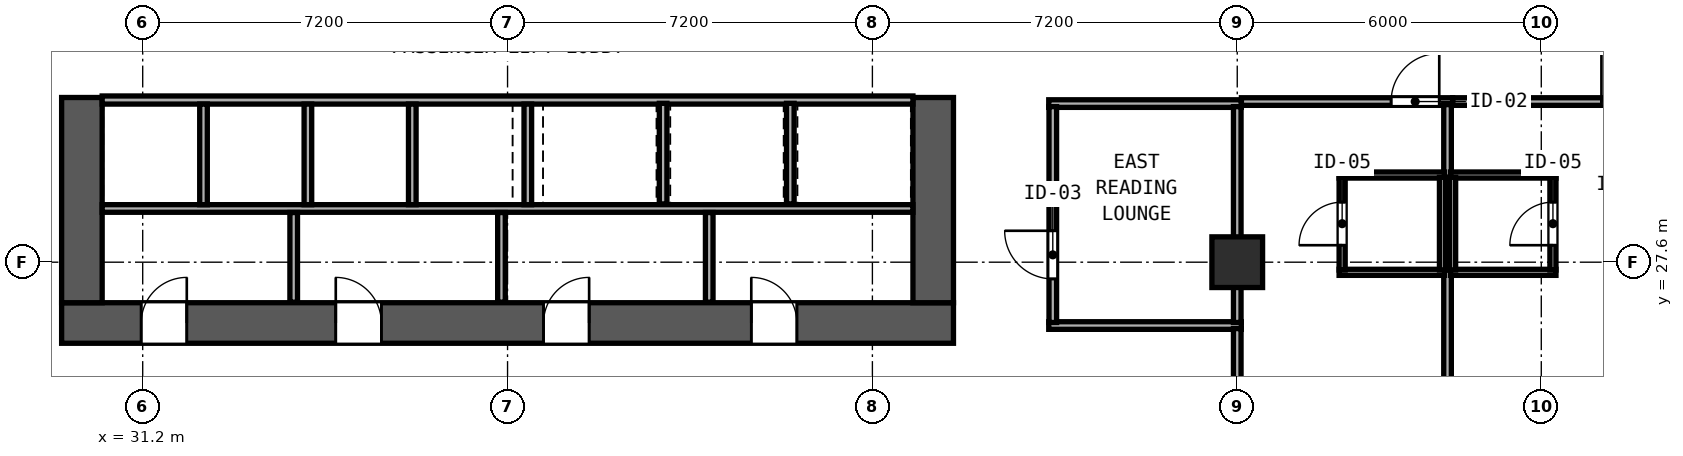
"""IFC4 building model, lengths in metres.
Left out: names, types, materials, properties, quantities, classifications, styles, units other than length and angle.
Written with IfcOpenShell. Run it as: python <this file> out.ifc"""

import sys

from ifc_helpers import new_model, si_unit, direction, frame, frame_2d, origin, origin_2d, place, context, subcontext, project, spatial, rectangle, hollow_rectangle, extrude, element, fill, save


model = new_model("IFC4")
c1 = context("Model", 3, precision=1e-05, world=origin(), true_north=direction((0.0, 1.0)))
c2 = subcontext(c1, "Body", "Model", "MODEL_VIEW")
j1 = project(units=[si_unit("LENGTHUNIT", "METRE"), si_unit("PLANEANGLEUNIT", "RADIAN")], contexts=[c1])
p1 = place(None, origin())
s1 = spatial("IfcSite", under=j1, at=p1, CompositionType="ELEMENT")
p2 = place(p1, origin())
s2 = spatial("IfcBuilding", under=s1, at=p2, CompositionType="ELEMENT")
p3 = place(p2, frame((0.0, 0.0, 81.8)))
s3 = spatial("IfcBuildingStorey", under=s2, at=p3, CompositionType="ELEMENT", Elevation=81.8)
p4 = place(p3, frame((29.6, 26.4, 0.0), z_axis=(0.0, 0.0, 1.0), x_axis=(1.0, 0.0, 0.0)))
e1 = element("IfcWall", 1, at=p4, inside=s3, PredefinedType="SHEAR", context=c2, shape_type="SweptSolid", body=[
    extrude(rectangle(XDim=17.6, YDim=0.8, at=frame_2d((8.8, 0.0))), origin(), (0.0, 0.0, 1.0), 3.6),
])
p5 = place(p4, frame((2.47, 0.0, 0.0), z_axis=(0.0, 0.0, 1.0), x_axis=(-1.0, 0.0, 0.0)))
e2 = element("IfcOpeningElement", 2, at=p5, cuts=e1, PredefinedType="OPENING", context=c2, shape_type="SweptSolid", body=[
    extrude(rectangle(XDim=0.9, YDim=2.1, at=frame_2d((0.45, 1.05))), frame((0.0, 0.41, 0.0), z_axis=(0.0, -1.0, 0.0), x_axis=(1.0, 0.0, 0.0)), (0.0, 0.0, 1.0), 0.82),
])
p6 = place(p4, frame((6.31, 0.0, 0.0), z_axis=(0.0, 0.0, 1.0), x_axis=(-1.0, 0.0, 0.0)))
e3 = element("IfcOpeningElement", 3, at=p6, cuts=e1, PredefinedType="OPENING", context=c2, shape_type="SweptSolid", body=[
    extrude(rectangle(XDim=0.9, YDim=2.1, at=frame_2d((0.45, 1.05))), frame((0.0, 0.41, 0.0), z_axis=(0.0, -1.0, 0.0), x_axis=(1.0, 0.0, 0.0)), (0.0, 0.0, 1.0), 0.82),
])
p7 = place(p4, frame((10.41, 0.0, 0.0), z_axis=(0.0, 0.0, 1.0), x_axis=(-1.0, 0.0, 0.0)))
e4 = element("IfcOpeningElement", 4, at=p7, cuts=e1, PredefinedType="OPENING", context=c2, shape_type="SweptSolid", body=[
    extrude(rectangle(XDim=0.9, YDim=2.1, at=frame_2d((0.45, 1.05))), frame((0.0, 0.41, 0.0), z_axis=(0.0, -1.0, 0.0), x_axis=(1.0, 0.0, 0.0)), (0.0, 0.0, 1.0), 0.82),
])
p8 = place(p4, frame((14.51, 0.0, 0.0), z_axis=(0.0, 0.0, 1.0), x_axis=(-1.0, 0.0, 0.0)))
e5 = element("IfcOpeningElement", 5, at=p8, cuts=e1, PredefinedType="OPENING", context=c2, shape_type="SweptSolid", body=[
    extrude(rectangle(XDim=0.9, YDim=2.1, at=frame_2d((0.45, 1.05))), frame((0.0, 0.41, 0.0), z_axis=(0.0, -1.0, 0.0), x_axis=(1.0, 0.0, 0.0)), (0.0, 0.0, 1.0), 0.82),
])
for number, where, z_axis, x_axis in (
    (6, (30.0, 26.8, 0.0), (0.0, 0.0, 1.0), (0.0, 1.0, 0.0)),
    (7, (46.8, 26.8, 0.0), (0.0, 0.0, 1.0), (0.0, 1.0, 0.0)),
):
    element("IfcWall", number, at=place(p3, frame(where, z_axis=z_axis, x_axis=x_axis)), inside=s3, PredefinedType="SHEAR", context=c2, shape_type="SweptSolid", body=[
        extrude(rectangle(XDim=4.05, YDim=0.8, at=frame_2d((2.025, 0.0))), origin(), (0.0, 0.0, 1.0), 3.6),
    ])
p9 = place(p3, frame((52.8, 27.6, 0.0), z_axis=(0.0, 0.0, 1.0), x_axis=(1.0, 0.0, 0.0)))
e8 = element("IfcColumn", 8, at=p9, inside=s3, PredefinedType="COLUMN", context=c2, shape_type="SweptSolid", body=[
    extrude(hollow_rectangle(XDim=1.0, YDim=1.0, WallThickness=0.038, at=origin_2d()), origin(), (0.0, 0.0, 1.0), 3.8),
])
p10 = place(p3, frame((30.4, 30.8, 0.0), z_axis=(0.0, 0.0, 1.0), x_axis=(1.0, 0.0, 0.0)))
e9 = element("IfcWall", 9, at=p10, inside=s3, PredefinedType="SOLIDWALL", context=c2, shape_type="SweptSolid", body=[
    extrude(rectangle(XDim=16.0, YDim=0.16, at=frame_2d((8.0, 0.0))), origin(), (0.0, 0.0, 1.0), 3.6),
])
p11 = place(p3, frame((30.4, 28.66, 0.0), z_axis=(0.0, 0.0, 1.0), x_axis=(1.0, 0.0, 0.0)))
e10 = element("IfcWall", 10, at=p11, inside=s3, PredefinedType="PARTITIONING", context=c2, shape_type="SweptSolid", body=[
    extrude(rectangle(XDim=16.0, YDim=0.15, at=frame_2d((8.0, 0.0))), origin(), (0.0, 0.0, 1.0), 3.6),
])
for number, where, z_axis, x_axis in (
    (11, (32.4, 28.735, 0.0), (0.0, 0.0, 1.0), (0.0, 1.0, 0.0)),
    (12, (34.46, 28.735, 0.0), (0.0, 0.0, 1.0), (0.0, 1.0, 0.0)),
    (13, (36.52, 28.735, 0.0), (0.0, 0.0, 1.0), (0.0, 1.0, 0.0)),
    (14, (38.8, 28.735, 0.0), (0.0, 0.0, 1.0), (0.0, 1.0, 0.0)),
):
    element("IfcWall", number, at=place(p3, frame(where, z_axis=z_axis, x_axis=x_axis)), inside=s3, PredefinedType="SOLIDWALL", context=c2, shape_type="SweptSolid", body=[
        extrude(rectangle(XDim=1.985, YDim=0.15, at=frame_2d((0.992, 0.0))), origin(), (0.0, 0.0, 1.0), 3.6),
    ])
for number, where, z_axis, x_axis in (
    (15, (34.18, 26.81, 0.0), (0.0, 0.0, 1.0), (0.0, 1.0, 0.0)),
    (16, (38.28, 26.81, 0.0), (0.0, 0.0, 1.0), (0.0, 1.0, 0.0)),
    (17, (42.38, 26.81, 0.0), (0.0, 0.0, 1.0), (0.0, 1.0, 0.0)),
):
    element("IfcWall", number, at=place(p3, frame(where, z_axis=z_axis, x_axis=x_axis)), inside=s3, PredefinedType="PARTITIONING", context=c2, shape_type="SweptSolid", body=[
        extrude(rectangle(XDim=1.77, YDim=0.15, at=frame_2d((0.885, 0.0))), origin(), (0.0, 0.0, 1.0), 3.6),
    ])
for number, where, z_axis, x_axis in (
    (18, (41.47, 28.75, 0.0), (0.0, 0.0, 1.0), (0.0, 1.0, 0.0)),
    (19, (43.98, 28.75, 0.0), (0.0, 0.0, 1.0), (0.0, 1.0, 0.0)),
):
    element("IfcWall", number, at=place(p3, frame(where, z_axis=z_axis, x_axis=x_axis)), inside=s3, PredefinedType="SOLIDWALL", context=c2, shape_type="SweptSolid", body=[
        extrude(rectangle(XDim=1.985, YDim=0.15, at=frame_2d((0.993, 0.0))), origin(), (0.0, 0.0, 1.0), 3.6),
    ])
for number, where, z_axis, x_axis in (
    (20, (49.08, 30.73, 0.0), (0.0, 0.0, 1.0), (1.0, 0.0, 0.0)),
    (21, (49.08, 26.35, 0.0), (0.0, 0.0, 1.0), (1.0, 0.0, 0.0)),
):
    element("IfcWall", number, at=place(p3, frame(where, z_axis=z_axis, x_axis=x_axis)), inside=s3, PredefinedType="PARTITIONING", context=c2, shape_type="SweptSolid", body=[
        extrude(rectangle(XDim=3.8, YDim=0.15, at=frame_2d((1.9, 0.0))), origin(), (0.0, 0.0, 1.0), 3.6),
    ])
p12 = place(p3, frame((49.16, 26.41, 0.0), z_axis=(0.0, 0.0, 1.0), x_axis=(0.0, 1.0, 0.0)))
e22 = element("IfcWall", 22, at=p12, inside=s3, PredefinedType="PARTITIONING", context=c2, shape_type="SweptSolid", body=[
    extrude(rectangle(XDim=4.26, YDim=0.15, at=frame_2d((2.13, 0.0))), origin(), (0.0, 0.0, 1.0), 3.6),
])
p13 = place(p12, frame((0.86, 0.0, 0.0)))
e23 = element("IfcOpeningElement", 23, at=p13, cuts=e22, PredefinedType="OPENING", context=c2, shape_type="SweptSolid", body=[
    extrude(rectangle(XDim=0.95, YDim=2.12, at=frame_2d((0.475, 1.06))), frame((0.0, 0.085, 0.0), z_axis=(0.0, -1.0, 0.0), x_axis=(1.0, 0.0, 0.0)), (0.0, 0.0, 1.0), 0.17),
])
p14 = place(p3, frame((52.8, 26.41, 0.0), z_axis=(0.0, 0.0, 1.0), x_axis=(0.0, 1.0, 0.0)))
e24 = element("IfcWall", 24, at=p14, inside=s3, PredefinedType="PARTITIONING", context=c2, shape_type="SweptSolid", body=[
    extrude(rectangle(XDim=4.26, YDim=0.15, at=frame_2d((2.13, 0.0))), origin(), (0.0, 0.0, 1.0), 3.097),
])
p15 = place(p3, frame((52.882, 30.77, 0.0), z_axis=(0.0, 0.0, 1.0), x_axis=(1.0, 0.0, 0.0)))
e25 = element("IfcWall", 25, at=p15, inside=s3, PredefinedType="PARTITIONING", context=c2, shape_type="SweptSolid", body=[
    extrude(rectangle(XDim=4.168, YDim=0.15, at=frame_2d((2.084, 0.0))), origin(), (0.0, 0.0, 1.0), 3.6),
])
p16 = place(p15, frame((3.905, 0.0, 0.0), z_axis=(0.0, 0.0, 1.0), x_axis=(-1.0, 0.0, 0.0)))
e26 = element("IfcOpeningElement", 26, at=p16, cuts=e25, PredefinedType="OPENING", context=c2, shape_type="SweptSolid", body=[
    extrude(rectangle(XDim=0.95, YDim=2.15, at=frame_2d((0.475, 1.075))), frame((0.0, 0.085, 0.0), z_axis=(0.0, -1.0, 0.0), x_axis=(1.0, 0.0, 0.0)), (0.0, 0.0, 1.0), 0.17),
])
p17 = place(p3, frame((52.8, 21.819, 0.0), z_axis=(0.0, 0.0, 1.0), x_axis=(0.0, 1.0, 0.0)))
e27 = element("IfcWall", 27, at=p17, inside=s3, PredefinedType="PARTITIONING", context=c2, shape_type="SweptSolid", body=[
    extrude(rectangle(XDim=4.471, YDim=0.15, at=frame_2d((2.236, 0.0))), origin(), (0.0, 0.0, 1.0), 3.097),
])
p18 = place(p3, frame((56.95, 18.889, 0.0), z_axis=(0.0, 0.0, 1.0), x_axis=(0.0, 1.0, 0.0)))
e28 = element("IfcWall", 28, at=p18, inside=s3, PredefinedType="PARTITIONING", context=c2, shape_type="SweptSolid", body=[
    extrude(rectangle(XDim=11.821, YDim=0.15, at=frame_2d((5.91, 0.0))), origin(), (0.0, 0.0, 1.0), 3.6),
])
p19 = place(p3, frame((54.81, 29.32, 0.0), z_axis=(0.0, 0.0, 1.0), x_axis=(1.0, 0.0, 0.0)))
e29 = element("IfcWall", 29, at=p19, inside=s3, PredefinedType="PARTITIONING", context=c2, shape_type="SweptSolid", body=[
    extrude(rectangle(XDim=2.08, YDim=0.12, at=frame_2d((1.04, 0.0))), origin(), (0.0, 0.0, 1.0), 3.6),
])
p20 = place(p3, frame((54.81, 27.4, 0.0), z_axis=(0.0, 0.0, 1.0), x_axis=(1.0, 0.0, 0.0)))
e30 = element("IfcWall", 30, at=p20, inside=s3, PredefinedType="PARTITIONING", context=c2, shape_type="SweptSolid", body=[
    extrude(rectangle(XDim=2.08, YDim=0.12, at=frame_2d((1.04, 0.0))), origin(), (0.0, 0.0, 1.0), 3.097),
])
p21 = place(p3, frame((54.87, 27.445, 0.0), z_axis=(0.0, 0.0, 1.0), x_axis=(0.0, 1.0, 0.0)))
e31 = element("IfcWall", 31, at=p21, inside=s3, PredefinedType="PARTITIONING", context=c2, shape_type="SweptSolid", body=[
    extrude(rectangle(XDim=1.83, YDim=0.12, at=frame_2d((0.915, 0.0))), origin(), (0.0, 0.0, 1.0), 3.6),
])
p22 = place(p21, frame((1.34, 0.0, 0.0), z_axis=(0.0, 0.0, 1.0), x_axis=(-1.0, 0.0, 0.0)))
e32 = element("IfcOpeningElement", 32, at=p22, cuts=e31, PredefinedType="OPENING", context=c2, shape_type="SweptSolid", body=[
    extrude(rectangle(XDim=0.85, YDim=2.1, at=frame_2d((0.425, 1.05))), frame((0.0, 0.07, 0.0), z_axis=(0.0, -1.0, 0.0), x_axis=(1.0, 0.0, 0.0)), (0.0, 0.0, 1.0), 0.14),
])
p23 = place(p3, frame((56.85, 27.445, 0.0), z_axis=(0.0, 0.0, 1.0), x_axis=(0.0, 1.0, 0.0)))
e33 = element("IfcWall", 33, at=p23, inside=s3, PredefinedType="PARTITIONING", context=c2, shape_type="SweptSolid", body=[
    extrude(rectangle(XDim=1.83, YDim=0.12, at=frame_2d((0.915, 0.0))), origin(), (0.0, 0.0, 1.0), 3.6),
])
p24 = place(p3, frame((57.052, 30.77, 0.0), z_axis=(0.0, 0.0, 1.0), x_axis=(1.0, 0.0, 0.0)))
e34 = element("IfcWall", 34, at=p24, inside=s3, PredefinedType="PARTITIONING", context=c2, shape_type="SweptSolid", body=[
    extrude(rectangle(XDim=4.148, YDim=0.15, at=frame_2d((2.074, 0.0))), origin(), (0.0, 0.0, 1.0), 3.6),
])
p25 = place(p24, frame((3.885, 0.0, 0.0), z_axis=(0.0, 0.0, 1.0), x_axis=(-1.0, 0.0, 0.0)))
e35 = element("IfcOpeningElement", 35, at=p25, cuts=e34, PredefinedType="OPENING", context=c2, shape_type="SweptSolid", body=[
    extrude(rectangle(XDim=0.95, YDim=2.15, at=frame_2d((0.475, 1.075))), frame((0.0, 0.085, 0.0), z_axis=(0.0, -1.0, 0.0), x_axis=(1.0, 0.0, 0.0)), (0.0, 0.0, 1.0), 0.17),
])
p26 = place(p3, frame((57.01, 29.32, 0.0), z_axis=(0.0, 0.0, 1.0), x_axis=(1.0, 0.0, 0.0)))
e36 = element("IfcWall", 36, at=p26, inside=s3, PredefinedType="PARTITIONING", context=c2, shape_type="SweptSolid", body=[
    extrude(rectangle(XDim=2.08, YDim=0.12, at=frame_2d((1.04, 0.0))), origin(), (0.0, 0.0, 1.0), 3.6),
])
p27 = place(p3, frame((57.01, 27.4, 0.0), z_axis=(0.0, 0.0, 1.0), x_axis=(1.0, 0.0, 0.0)))
e37 = element("IfcWall", 37, at=p27, inside=s3, PredefinedType="PARTITIONING", context=c2, shape_type="SweptSolid", body=[
    extrude(rectangle(XDim=2.08, YDim=0.12, at=frame_2d((1.04, 0.0))), origin(), (0.0, 0.0, 1.0), 3.097),
])
p28 = place(p3, frame((57.05, 27.445, 0.0), z_axis=(0.0, 0.0, 1.0), x_axis=(0.0, 1.0, 0.0)))
e38 = element("IfcWall", 38, at=p28, inside=s3, PredefinedType="PARTITIONING", context=c2, shape_type="SweptSolid", body=[
    extrude(rectangle(XDim=1.83, YDim=0.12, at=frame_2d((0.915, 0.0))), origin(), (0.0, 0.0, 1.0), 3.6),
])
p29 = place(p3, frame((59.03, 27.445, 0.0), z_axis=(0.0, 0.0, 1.0), x_axis=(0.0, 1.0, 0.0)))
e39 = element("IfcWall", 39, at=p29, inside=s3, PredefinedType="PARTITIONING", context=c2, shape_type="SweptSolid", body=[
    extrude(rectangle(XDim=1.83, YDim=0.12, at=frame_2d((0.915, 0.0))), origin(), (0.0, 0.0, 1.0), 3.6),
])
p30 = place(p29, frame((0.49, 0.0, 0.0)))
e40 = element("IfcOpeningElement", 40, at=p30, cuts=e39, PredefinedType="OPENING", context=c2, shape_type="SweptSolid", body=[
    extrude(rectangle(XDim=0.85, YDim=2.1, at=frame_2d((0.425, 1.05))), frame((0.0, 0.07, 0.0), z_axis=(0.0, -1.0, 0.0), x_axis=(1.0, 0.0, 0.0)), (0.0, 0.0, 1.0), 0.14),
])
p31 = place(p5, origin())
e41 = element("IfcDoor", 41, at=p31, inside=s3, OperationType="SINGLE_SWING_LEFT", PredefinedType="DOOR", context=c2, shape_type="SweptSolid", body=[
    extrude(rectangle(XDim=0.9, YDim=2.1, at=frame_2d((0.45, 1.05))), frame((0.0, -0.195, 0.0), z_axis=(0.0, -1.0, 0.0), x_axis=(1.0, 0.0, 0.0)), (0.0, 0.0, 1.0), 0.05),
])
fill(e2, e41)
p32 = place(p6, origin())
e42 = element("IfcDoor", 42, at=p32, inside=s3, OperationType="SINGLE_SWING_RIGHT", PredefinedType="DOOR", context=c2, shape_type="SweptSolid", body=[
    extrude(rectangle(XDim=0.9, YDim=2.1, at=frame_2d((0.45, 1.05))), frame((0.0, -0.195, 0.0), z_axis=(0.0, -1.0, 0.0), x_axis=(1.0, 0.0, 0.0)), (0.0, 0.0, 1.0), 0.05),
])
fill(e3, e42)
p33 = place(p7, origin())
e43 = element("IfcDoor", 43, at=p33, inside=s3, OperationType="SINGLE_SWING_LEFT", PredefinedType="DOOR", context=c2, shape_type="SweptSolid", body=[
    extrude(rectangle(XDim=0.9, YDim=2.1, at=frame_2d((0.45, 1.05))), frame((0.0, -0.195, 0.0), z_axis=(0.0, -1.0, 0.0), x_axis=(1.0, 0.0, 0.0)), (0.0, 0.0, 1.0), 0.05),
])
fill(e4, e43)
p34 = place(p8, origin())
e44 = element("IfcDoor", 44, at=p34, inside=s3, OperationType="SINGLE_SWING_RIGHT", PredefinedType="DOOR", context=c2, shape_type="SweptSolid", body=[
    extrude(rectangle(XDim=0.9, YDim=2.1, at=frame_2d((0.45, 1.05))), frame((0.0, -0.195, 0.0), z_axis=(0.0, -1.0, 0.0), x_axis=(1.0, 0.0, 0.0)), (0.0, 0.0, 1.0), 0.05),
])
fill(e5, e44)
p35 = place(p13, origin())
e45 = element("IfcDoor", 45, at=p35, inside=s3, OperationType="SINGLE_SWING_RIGHT", PredefinedType="DOOR", context=c2, shape_type="SweptSolid", body=[
    extrude(rectangle(XDim=0.95, YDim=2.12, at=frame_2d((0.475, 1.06))), frame((0.0, 0.025, 0.0), z_axis=(0.0, -1.0, 0.0), x_axis=(1.0, 0.0, 0.0)), (0.0, 0.0, 1.0), 0.05),
])
fill(e23, e45)
p36 = place(p16, origin())
e46 = element("IfcDoor", 46, at=p36, inside=s3, OperationType="SINGLE_SWING_LEFT", PredefinedType="DOOR", context=c2, shape_type="SweptSolid", body=[
    extrude(rectangle(XDim=0.95, YDim=2.15, at=frame_2d((0.475, 1.075))), frame((0.0, 0.025, 0.0), z_axis=(0.0, -1.0, 0.0), x_axis=(1.0, 0.0, 0.0)), (0.0, 0.0, 1.0), 0.05),
])
fill(e26, e46)
p37 = place(p22, origin())
e47 = element("IfcDoor", 47, at=p37, inside=s3, OperationType="SINGLE_SWING_RIGHT", PredefinedType="DOOR", context=c2, shape_type="SweptSolid", body=[
    extrude(rectangle(XDim=0.85, YDim=2.1, at=frame_2d((0.425, 1.05))), frame((0.0, 0.025, 0.0), z_axis=(0.0, -1.0, 0.0), x_axis=(1.0, 0.0, 0.0)), (0.0, 0.0, 1.0), 0.05),
])
fill(e32, e47)
p38 = place(p25, origin())
e48 = element("IfcDoor", 48, at=p38, inside=s3, OperationType="SINGLE_SWING_RIGHT", PredefinedType="DOOR", context=c2, shape_type="SweptSolid", body=[
    extrude(rectangle(XDim=0.95, YDim=2.15, at=frame_2d((0.475, 1.075))), frame((0.0, 0.025, 0.0), z_axis=(0.0, -1.0, 0.0), x_axis=(1.0, 0.0, 0.0)), (0.0, 0.0, 1.0), 0.05),
])
fill(e35, e48)
p39 = place(p30, origin())
e49 = element("IfcDoor", 49, at=p39, inside=s3, OperationType="SINGLE_SWING_LEFT", PredefinedType="DOOR", context=c2, shape_type="SweptSolid", body=[
    extrude(rectangle(XDim=0.85, YDim=2.1, at=frame_2d((0.425, 1.05))), frame((0.0, 0.025, 0.0), z_axis=(0.0, -1.0, 0.0), x_axis=(1.0, 0.0, 0.0)), (0.0, 0.0, 1.0), 0.05),
])
fill(e40, e49)
save(model, sys.argv[1])
